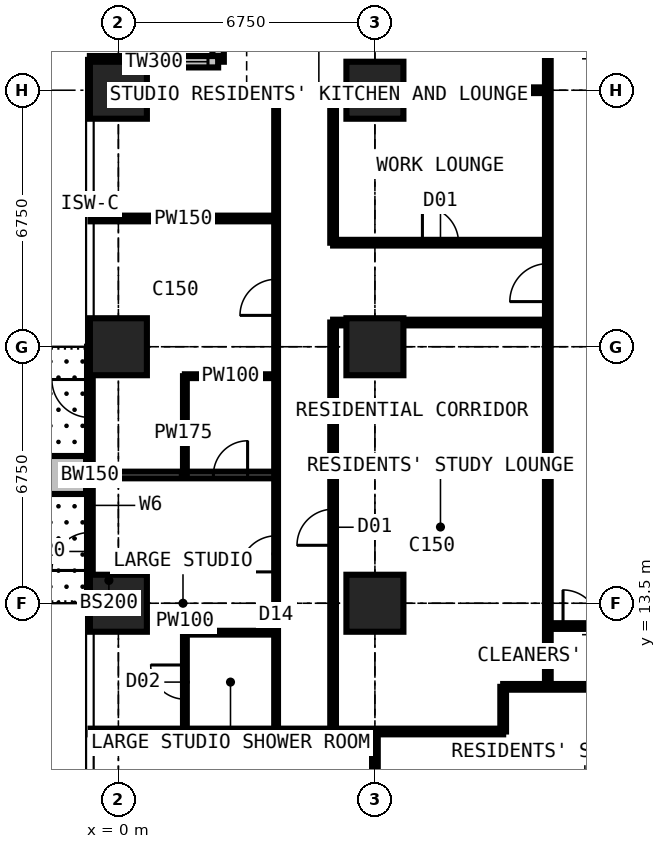
"""IFC4 building model, lengths in metres.
Left out: names, types, materials, properties, quantities, classifications, styles, units other than length and angle.
Written with IfcOpenShell. Run it as: python <this file> out.ifc"""

import sys

from ifc_helpers import new_model, si_unit, direction, frame, frame_2d, origin, origin_2d, place, context, subcontext, project, spatial, rectangle, extrude, element, fill, save


model = new_model("IFC4")
c1 = context("Model", 3, precision=1e-05, world=origin(), true_north=direction((0.0, 1.0)))
c2 = subcontext(c1, "Body", "Model", "MODEL_VIEW")
j1 = project(units=[si_unit("LENGTHUNIT", "METRE"), si_unit("PLANEANGLEUNIT", "RADIAN")], contexts=[c1])
p1 = place(None, origin())
s1 = spatial("IfcSite", under=j1, at=p1, CompositionType="ELEMENT")
p2 = place(p1, origin())
s2 = spatial("IfcBuilding", under=s1, at=p2, CompositionType="ELEMENT")
p3 = place(p2, frame((0.0, 0.0, 149.4)))
s3 = spatial("IfcBuildingStorey", under=s2, at=p3, CompositionType="ELEMENT", Elevation=149.4)
for number, where, z_axis, x_axis in (
    (1, (0.0, 13.5, 0.0), (0.0, 0.0, 1.0), (1.0, 0.0, 0.0)),
    (2, (0.0, 20.25, 0.0), (0.0, 0.0, 1.0), (1.0, 0.0, 0.0)),
    (3, (0.0, 27.0, 0.0), (0.0, 0.0, 1.0), (1.0, 0.0, 0.0)),
    (4, (6.75, 13.5, 0.0), (0.0, 0.0, 1.0), (1.0, 0.0, 0.0)),
    (5, (6.75, 20.25, 0.0), (0.0, 0.0, 1.0), (1.0, 0.0, 0.0)),
    (6, (6.75, 27.0, 0.0), (0.0, 0.0, 1.0), (1.0, 0.0, 0.0)),
):
    element("IfcColumn", number, at=place(p3, frame(where, z_axis=z_axis, x_axis=x_axis)), inside=s3, PredefinedType="COLUMN", context=c2, shape_type="SweptSolid", body=[
        extrude(rectangle(XDim=1.5, YDim=1.5, at=origin_2d()), origin(), (0.0, 0.0, 1.0), 3.6),
    ])
p4 = place(p3, frame((2.625, 31.125, 0.0), z_axis=(0.0, 0.0, 1.0), x_axis=(0.0, -1.0, 0.0)))
e7 = element("IfcWall", 7, at=p4, inside=s3, PredefinedType="SOLIDWALL", context=c2, shape_type="SweptSolid", body=[
    extrude(rectangle(XDim=3.375, YDim=0.3, at=frame_2d((1.688, 0.0))), origin(), (0.0, 0.0, 1.0), 3.375),
])
p5 = place(p4, frame((0.788, 0.0, 0.6)))
e8 = element("IfcOpeningElement", 8, at=p5, cuts=e7, PredefinedType="OPENING", context=c2, shape_type="SweptSolid", body=[
    extrude(rectangle(XDim=1.8, YDim=2.1, at=frame_2d((0.9, 1.05))), frame((0.0, 0.16, 0.0), z_axis=(0.0, -1.0, 0.0), x_axis=(1.0, 0.0, 0.0)), (0.0, 0.0, 1.0), 0.32),
])
p6 = place(p3, frame((2.625, 27.75, 0.0), z_axis=(0.0, 0.0, 1.0), x_axis=(-1.0, 0.0, 0.0)))
e9 = element("IfcWall", 9, at=p6, inside=s3, PredefinedType="SOLIDWALL", context=c2, shape_type="SweptSolid", body=[
    extrude(rectangle(XDim=3.375, YDim=0.3, at=frame_2d((1.688, 0.0))), origin(), (0.0, 0.0, 1.0), 3.375),
])
p7 = place(p6, frame((0.268, 0.0, 0.9)))
e10 = element("IfcOpeningElement", 10, at=p7, cuts=e9, PredefinedType="OPENING", context=c2, shape_type="SweptSolid", body=[
    extrude(rectangle(XDim=1.5, YDim=1.8, at=frame_2d((0.75, 0.9))), frame((0.0, 0.16, 0.0), z_axis=(0.0, -1.0, 0.0), x_axis=(1.0, 0.0, 0.0)), (0.0, 0.0, 1.0), 0.32),
])
p8 = place(p3, frame((-0.75, 13.5, 0.0), z_axis=(0.0, 0.0, 1.0), x_axis=(0.0, 1.0, 0.0)))
e11 = element("IfcWall", 11, at=p8, inside=s3, PredefinedType="SOLIDWALL", context=c2, shape_type="SweptSolid", body=[
    extrude(rectangle(XDim=6.75, YDim=0.15, at=frame_2d((3.375, 0.0))), origin(), (0.0, 0.0, 1.0), 3.375),
])
p9 = place(p8, frame((0.863, 0.0, 0.0)))
e12 = element("IfcOpeningElement", 12, at=p9, cuts=e11, PredefinedType="OPENING", context=c2, shape_type="SweptSolid", body=[
    extrude(rectangle(XDim=1.0, YDim=2.2, at=frame_2d((0.5, 1.1))), frame((0.0, 0.085, 0.0), z_axis=(0.0, -1.0, 0.0), x_axis=(1.0, 0.0, 0.0)), (0.0, 0.0, 1.0), 0.17),
])
p10 = place(p8, frame((1.975, 0.0, 0.9)))
e13 = element("IfcOpeningElement", 13, at=p10, cuts=e11, PredefinedType="OPENING", context=c2, shape_type="SweptSolid", body=[
    extrude(rectangle(XDim=1.2, YDim=1.8, at=frame_2d((0.6, 0.9))), frame((0.0, 0.085, 0.0), z_axis=(0.0, -1.0, 0.0), x_axis=(1.0, 0.0, 0.0)), (0.0, 0.0, 1.0), 0.17),
])
p11 = place(p8, frame((4.887, 0.0, 0.0)))
e14 = element("IfcOpeningElement", 14, at=p11, cuts=e11, PredefinedType="OPENING", context=c2, shape_type="SweptSolid", body=[
    extrude(rectangle(XDim=1.0, YDim=2.2, at=frame_2d((0.5, 1.1))), frame((0.0, 0.085, 0.0), z_axis=(0.0, -1.0, 0.0), x_axis=(1.0, 0.0, 0.0)), (0.0, 0.0, 1.0), 0.17),
])
p12 = place(p8, frame((3.575, 0.0, 0.9)))
e15 = element("IfcOpeningElement", 15, at=p12, cuts=e11, PredefinedType="OPENING", context=c2, shape_type="SweptSolid", body=[
    extrude(rectangle(XDim=1.2, YDim=1.8, at=frame_2d((0.6, 0.9))), frame((0.0, 0.085, 0.0), z_axis=(0.0, -1.0, 0.0), x_axis=(1.0, 0.0, 0.0)), (0.0, 0.0, 1.0), 0.17),
])
p13 = place(p3, frame((-0.85, 16.875, 0.0), z_axis=(0.0, 0.0, 1.0), x_axis=(-1.0, 0.0, 0.0)))
e16 = element("IfcWall", 16, at=p13, inside=s3, PredefinedType="USERDEFINED", context=c2, shape_type="SweptSolid", body=[
    extrude(rectangle(XDim=2.2, YDim=1.0, at=frame_2d((1.1, 0.0))), origin(), (0.0, 0.0, 1.0), 0.9),
])
p14 = place(p3, frame((-0.734, 10.125, 0.0), z_axis=(0.0, 0.0, 1.0), x_axis=(1.0, 0.0, 0.0)))
e17 = element("IfcWall", 17, at=p14, inside=s3, PredefinedType="PARTITIONING", context=c2, shape_type="SweptSolid", body=[
    extrude(rectangle(XDim=10.859, YDim=0.15, at=frame_2d((5.429, 0.0))), origin(), (0.0, 0.0, 1.0), 3.375),
])
p15 = place(p3, frame((-0.734, 16.875, 0.0), z_axis=(0.0, 0.0, 1.0), x_axis=(1.0, 0.0, 0.0)))
e18 = element("IfcWall", 18, at=p15, inside=s3, PredefinedType="PARTITIONING", context=c2, shape_type="SweptSolid", body=[
    extrude(rectangle(XDim=4.884, YDim=0.175, at=frame_2d((2.442, 0.0))), origin(), (0.0, 0.0, 1.0), 3.375),
])
p16 = place(p15, frame((3.234, 0.0, 0.0)))
e19 = element("IfcOpeningElement", 19, at=p16, cuts=e18, PredefinedType="OPENING", context=c2, shape_type="SweptSolid", body=[
    extrude(rectangle(XDim=0.9, YDim=2.2, at=frame_2d((0.45, 1.1))), frame((0.0, 0.097, 0.0), z_axis=(0.0, -1.0, 0.0), x_axis=(1.0, 0.0, 0.0)), (0.0, 0.0, 1.0), 0.195),
])
p17 = place(p3, frame((-0.734, 23.625, 0.0), z_axis=(0.0, 0.0, 1.0), x_axis=(1.0, 0.0, 0.0)))
e20 = element("IfcWall", 20, at=p17, inside=s3, PredefinedType="PARTITIONING", context=c2, shape_type="SweptSolid", body=[
    extrude(rectangle(XDim=4.884, YDim=0.15, at=frame_2d((2.442, 0.0))), origin(), (0.0, 0.0, 1.0), 3.375),
])
p18 = place(p3, frame((1.75, 10.125, 0.0), z_axis=(0.0, 0.0, 1.0), x_axis=(0.0, 1.0, 0.0)))
e21 = element("IfcWall", 21, at=p18, inside=s3, PredefinedType="PARTITIONING", context=c2, shape_type="SweptSolid", body=[
    extrude(rectangle(XDim=2.6, YDim=0.1, at=frame_2d((1.3, 0.0))), origin(), (0.0, 0.0, 1.0), 3.375),
])
p19 = place(p18, frame((0.85, 0.0, 0.0)))
e22 = element("IfcOpeningElement", 22, at=p19, cuts=e21, PredefinedType="OPENING", context=c2, shape_type="SweptSolid", body=[
    extrude(rectangle(XDim=0.9, YDim=2.2, at=frame_2d((0.45, 1.1))), frame((0.0, 0.06, 0.0), z_axis=(0.0, -1.0, 0.0), x_axis=(1.0, 0.0, 0.0)), (0.0, 0.0, 1.0), 0.12),
])
p20 = place(p3, frame((1.75, 12.725, 0.0), z_axis=(0.0, 0.0, 1.0), x_axis=(1.0, 0.0, 0.0)))
e23 = element("IfcWall", 23, at=p20, inside=s3, PredefinedType="PARTITIONING", context=c2, shape_type="SweptSolid", body=[
    extrude(rectangle(XDim=2.4, YDim=0.1, at=frame_2d((1.2, 0.0))), origin(), (0.0, 0.0, 1.0), 3.375),
])
p21 = place(p3, frame((1.75, 16.875, 0.0), z_axis=(0.0, 0.0, 1.0), x_axis=(0.0, 1.0, 0.0)))
e24 = element("IfcWall", 24, at=p21, inside=s3, PredefinedType="PARTITIONING", context=c2, shape_type="SweptSolid", body=[
    extrude(rectangle(XDim=2.6, YDim=0.1, at=frame_2d((1.3, 0.0))), origin(), (0.0, 0.0, 1.0), 3.375),
])
p22 = place(p3, frame((1.75, 19.475, 0.0), z_axis=(0.0, 0.0, 1.0), x_axis=(1.0, 0.0, 0.0)))
e25 = element("IfcWall", 25, at=p22, inside=s3, PredefinedType="PARTITIONING", context=c2, shape_type="SweptSolid", body=[
    extrude(rectangle(XDim=2.4, YDim=0.1, at=frame_2d((1.2, 0.0))), origin(), (0.0, 0.0, 1.0), 3.375),
])
p23 = place(p3, frame((4.15, 10.125, 0.0), z_axis=(0.0, 0.0, 1.0), x_axis=(0.0, 1.0, 0.0)))
e26 = element("IfcWall", 26, at=p23, inside=s3, PredefinedType="PARTITIONING", context=c2, shape_type="SweptSolid", body=[
    extrude(rectangle(XDim=16.875, YDim=0.1, at=frame_2d((8.438, 0.0))), origin(), (0.0, 0.0, 1.0), 3.375),
])
p24 = place(p23, frame((4.2, 0.0, 0.0)))
e27 = element("IfcOpeningElement", 27, at=p24, cuts=e26, PredefinedType="OPENING", context=c2, shape_type="SweptSolid", body=[
    extrude(rectangle(XDim=0.95, YDim=2.2, at=frame_2d((0.475, 1.1))), frame((0.0, 0.06, 0.0), z_axis=(0.0, -1.0, 0.0), x_axis=(1.0, 0.0, 0.0)), (0.0, 0.0, 1.0), 0.12),
])
p25 = place(p23, frame((10.95, 0.0, 0.0)))
e28 = element("IfcOpeningElement", 28, at=p25, cuts=e26, PredefinedType="OPENING", context=c2, shape_type="SweptSolid", body=[
    extrude(rectangle(XDim=0.95, YDim=2.2, at=frame_2d((0.475, 1.1))), frame((0.0, 0.06, 0.0), z_axis=(0.0, -1.0, 0.0), x_axis=(1.0, 0.0, 0.0)), (0.0, 0.0, 1.0), 0.12),
])
p26 = place(p3, frame((4.15, 27.0, 0.0), z_axis=(0.0, 0.0, 1.0), x_axis=(1.0, 0.0, 0.0)))
e29 = element("IfcWall", 29, at=p26, inside=s3, PredefinedType="PARTITIONING", context=c2, shape_type="SweptSolid", body=[
    extrude(rectangle(XDim=7.15, YDim=0.15, at=frame_2d((3.575, 0.0))), origin(), (0.0, 0.0, 1.0), 2.806),
])
p27 = place(p3, frame((5.65, 10.125, 0.0), z_axis=(0.0, 0.0, 1.0), x_axis=(0.0, 1.0, 0.0)))
e30 = element("IfcWall", 30, at=p27, inside=s3, PredefinedType="PARTITIONING", context=c2, shape_type="SweptSolid", body=[
    extrude(rectangle(XDim=10.762, YDim=0.15, at=frame_2d((5.381, 0.0))), origin(), (0.0, 0.0, 1.0), 3.375),
])
p28 = place(p27, frame((4.9, 0.0, 0.0)))
e31 = element("IfcOpeningElement", 31, at=p28, cuts=e30, PredefinedType="OPENING", context=c2, shape_type="SweptSolid", body=[
    extrude(rectangle(XDim=0.95, YDim=2.2, at=frame_2d((0.475, 1.1))), frame((0.0, 0.085, 0.0), z_axis=(0.0, -1.0, 0.0), x_axis=(1.0, 0.0, 0.0)), (0.0, 0.0, 1.0), 0.17),
])
p29 = place(p3, frame((5.65, 20.887, 0.0), z_axis=(0.0, 0.0, 1.0), x_axis=(1.0, 0.0, 0.0)))
e32 = element("IfcWall", 32, at=p29, inside=s3, PredefinedType="PARTITIONING", context=c2, shape_type="SweptSolid", body=[
    extrude(rectangle(XDim=5.65, YDim=0.15, at=frame_2d((2.825, 0.0))), origin(), (0.0, 0.0, 1.0), 3.375),
])
p30 = place(p3, frame((5.65, 22.988, 0.0), z_axis=(0.0, 0.0, 1.0), x_axis=(0.0, 1.0, 0.0)))
e33 = element("IfcWall", 33, at=p30, inside=s3, PredefinedType="PARTITIONING", context=c2, shape_type="SweptSolid", body=[
    extrude(rectangle(XDim=4.012, YDim=0.15, at=frame_2d((2.006, 0.0))), origin(), (0.0, 0.0, 1.0), 3.375),
])
p31 = place(p3, frame((5.65, 22.988, 0.0), z_axis=(0.0, 0.0, 1.0), x_axis=(1.0, 0.0, 0.0)))
e34 = element("IfcWall", 34, at=p31, inside=s3, PredefinedType="PARTITIONING", context=c2, shape_type="SweptSolid", body=[
    extrude(rectangle(XDim=5.65, YDim=0.15, at=frame_2d((2.825, 0.0))), origin(), (0.0, 0.0, 1.0), 3.375),
])
p32 = place(p31, frame((2.35, 0.0, 0.0)))
e35 = element("IfcOpeningElement", 35, at=p32, cuts=e34, PredefinedType="OPENING", context=c2, shape_type="SweptSolid", body=[
    extrude(rectangle(XDim=0.95, YDim=2.2, at=frame_2d((0.475, 1.1))), frame((0.0, 0.085, 0.0), z_axis=(0.0, -1.0, 0.0), x_axis=(1.0, 0.0, 0.0)), (0.0, 0.0, 1.0), 0.17),
])
p33 = place(p3, frame((6.75, 4.15, 0.0), z_axis=(0.0, 0.0, 1.0), x_axis=(0.0, 1.0, 0.0)))
e36 = element("IfcWall", 36, at=p33, inside=s3, PredefinedType="PARTITIONING", context=c2, shape_type="SweptSolid", body=[
    extrude(rectangle(XDim=5.975, YDim=0.15, at=frame_2d((2.988, 0.0))), origin(), (0.0, 0.0, 1.0), 2.877),
])
p34 = place(p3, frame((10.125, 10.125, 0.0), z_axis=(0.0, 0.0, 1.0), x_axis=(0.0, 1.0, 0.0)))
e37 = element("IfcWall", 37, at=p34, inside=s3, PredefinedType="PARTITIONING", context=c2, shape_type="SweptSolid", body=[
    extrude(rectangle(XDim=1.175, YDim=0.15, at=frame_2d((0.587, 0.0))), origin(), (0.0, 0.0, 1.0), 3.375),
])
p35 = place(p3, frame((10.125, 11.3, 0.0), z_axis=(0.0, 0.0, 1.0), x_axis=(1.0, 0.0, 0.0)))
e38 = element("IfcWall", 38, at=p35, inside=s3, PredefinedType="PARTITIONING", context=c2, shape_type="SweptSolid", body=[
    extrude(rectangle(XDim=20.475, YDim=0.15, at=frame_2d((10.238, 0.0))), origin(), (0.0, 0.0, 1.0), 3.375),
])
p36 = place(p35, frame((8.425, 0.0, 0.0)))
e39 = element("IfcOpeningElement", 39, at=p36, cuts=e38, PredefinedType="OPENING", context=c2, shape_type="SweptSolid", body=[
    extrude(rectangle(XDim=1.0, YDim=2.2, at=frame_2d((0.5, 1.1))), frame((0.0, 0.085, 0.0), z_axis=(0.0, -1.0, 0.0), x_axis=(1.0, 0.0, 0.0)), (0.0, 0.0, 1.0), 0.17),
])
p37 = place(p35, frame((10.975, 0.0, 0.0)))
e40 = element("IfcOpeningElement", 40, at=p37, cuts=e38, PredefinedType="OPENING", context=c2, shape_type="SweptSolid", body=[
    extrude(rectangle(XDim=1.0, YDim=2.2, at=frame_2d((0.5, 1.1))), frame((0.0, 0.085, 0.0), z_axis=(0.0, -1.0, 0.0), x_axis=(1.0, 0.0, 0.0)), (0.0, 0.0, 1.0), 0.17),
])
p38 = place(p35, frame((4.875, 0.0, 0.0)))
e41 = element("IfcOpeningElement", 41, at=p38, cuts=e38, PredefinedType="OPENING", context=c2, shape_type="SweptSolid", body=[
    extrude(rectangle(XDim=0.95, YDim=2.2, at=frame_2d((0.475, 1.1))), frame((0.0, 0.085, 0.0), z_axis=(0.0, -1.0, 0.0), x_axis=(1.0, 0.0, 0.0)), (0.0, 0.0, 1.0), 0.17),
])
p39 = place(p3, frame((11.3, 11.3, 0.0), z_axis=(0.0, 0.0, 1.0), x_axis=(0.0, 1.0, 0.0)))
e42 = element("IfcWall", 42, at=p39, inside=s3, PredefinedType="PARTITIONING", context=c2, shape_type="SweptSolid", body=[
    extrude(rectangle(XDim=19.3, YDim=0.15, at=frame_2d((9.65, 0.0))), origin(), (0.0, 0.0, 1.0), 3.375),
])
p40 = place(p39, frame((18.1, 0.0, 0.0)))
e43 = element("IfcOpeningElement", 43, at=p40, cuts=e42, PredefinedType="OPENING", context=c2, shape_type="SweptSolid", body=[
    extrude(rectangle(XDim=1.0, YDim=2.2, at=frame_2d((0.5, 1.1))), frame((0.0, 0.085, 0.0), z_axis=(0.0, -1.0, 0.0), x_axis=(1.0, 0.0, 0.0)), (0.0, 0.0, 1.0), 0.17),
])
p41 = place(p39, frame((10.137, 0.0, 0.0)))
e44 = element("IfcOpeningElement", 44, at=p41, cuts=e42, PredefinedType="OPENING", context=c2, shape_type="SweptSolid", body=[
    extrude(rectangle(XDim=1.0, YDim=2.2, at=frame_2d((0.5, 1.1))), frame((0.0, 0.085, 0.0), z_axis=(0.0, -1.0, 0.0), x_axis=(1.0, 0.0, 0.0)), (0.0, 0.0, 1.0), 0.17),
])
p42 = place(p3, frame((11.3, 12.9, 0.0), z_axis=(0.0, 0.0, 1.0), x_axis=(1.0, 0.0, 0.0)))
e45 = element("IfcWall", 45, at=p42, inside=s3, PredefinedType="PARTITIONING", context=c2, shape_type="SweptSolid", body=[
    extrude(rectangle(XDim=1.8, YDim=0.15, at=frame_2d((0.9, 0.0))), origin(), (0.0, 0.0, 1.0), 2.806),
])
p43 = place(p42, frame((0.4, 0.0, 0.0)))
e46 = element("IfcOpeningElement", 46, at=p43, cuts=e45, PredefinedType="OPENING", context=c2, shape_type="SweptSolid", body=[
    extrude(rectangle(XDim=0.95, YDim=2.2, at=frame_2d((0.475, 1.1))), frame((0.0, 0.085, 0.0), z_axis=(0.0, -1.0, 0.0), x_axis=(1.0, 0.0, 0.0)), (0.0, 0.0, 1.0), 0.17),
])
p44 = place(p7, origin())
e47 = element("IfcWindow", 47, at=p44, inside=s3, PartitioningType="SINGLE_PANEL", PredefinedType="WINDOW", context=c2, shape_type="SweptSolid", body=[
    extrude(rectangle(XDim=1.5, YDim=1.8, at=frame_2d((0.75, 0.9))), frame((0.0, 0.03, 0.0), z_axis=(0.0, -1.0, 0.0), x_axis=(1.0, 0.0, 0.0)), (0.0, 0.0, 1.0), 0.06),
])
fill(e10, e47)
p45 = place(p9, origin())
e48 = element("IfcDoor", 48, at=p45, inside=s3, OperationType="SINGLE_SWING_LEFT", PredefinedType="DOOR", context=c2, shape_type="SweptSolid", body=[
    extrude(rectangle(XDim=1.0, YDim=2.2, at=frame_2d((0.5, 1.1))), frame((0.0, 0.025, 0.0), z_axis=(0.0, -1.0, 0.0), x_axis=(1.0, 0.0, 0.0)), (0.0, 0.0, 1.0), 0.05),
])
fill(e12, e48)
p46 = place(p10, origin())
e49 = element("IfcWindow", 49, at=p46, inside=s3, PartitioningType="SINGLE_PANEL", PredefinedType="WINDOW", context=c2, shape_type="SweptSolid", body=[
    extrude(rectangle(XDim=1.2, YDim=1.8, at=frame_2d((0.6, 0.9))), frame((0.0, 0.03, 0.0), z_axis=(0.0, -1.0, 0.0), x_axis=(1.0, 0.0, 0.0)), (0.0, 0.0, 1.0), 0.06),
])
fill(e13, e49)
p47 = place(p11, origin())
e50 = element("IfcDoor", 50, at=p47, inside=s3, OperationType="SINGLE_SWING_RIGHT", PredefinedType="DOOR", context=c2, shape_type="SweptSolid", body=[
    extrude(rectangle(XDim=1.0, YDim=2.2, at=frame_2d((0.5, 1.1))), frame((0.0, 0.025, 0.0), z_axis=(0.0, -1.0, 0.0), x_axis=(1.0, 0.0, 0.0)), (0.0, 0.0, 1.0), 0.05),
])
fill(e14, e50)
p48 = place(p12, origin())
e51 = element("IfcWindow", 51, at=p48, inside=s3, PartitioningType="SINGLE_PANEL", PredefinedType="WINDOW", context=c2, shape_type="SweptSolid", body=[
    extrude(rectangle(XDim=1.2, YDim=1.8, at=frame_2d((0.6, 0.9))), frame((0.0, 0.03, 0.0), z_axis=(0.0, -1.0, 0.0), x_axis=(1.0, 0.0, 0.0)), (0.0, 0.0, 1.0), 0.06),
])
fill(e15, e51)
p49 = place(p43, origin())
e52 = element("IfcDoor", 52, at=p49, inside=s3, OperationType="SINGLE_SWING_LEFT", PredefinedType="DOOR", context=c2, shape_type="SweptSolid", body=[
    extrude(rectangle(XDim=0.95, YDim=2.2, at=frame_2d((0.475, 1.1))), frame((0.0, 0.025, 0.0), z_axis=(0.0, -1.0, 0.0), x_axis=(1.0, 0.0, 0.0)), (0.0, 0.0, 1.0), 0.05),
])
fill(e46, e52)
p50 = place(p24, origin())
e53 = element("IfcDoor", 53, at=p50, inside=s3, OperationType="SINGLE_SWING_LEFT", PredefinedType="DOOR", context=c2, shape_type="SweptSolid", body=[
    extrude(rectangle(XDim=0.95, YDim=2.2, at=frame_2d((0.475, 1.1))), frame((0.0, 0.025, 0.0), z_axis=(0.0, -1.0, 0.0), x_axis=(1.0, 0.0, 0.0)), (0.0, 0.0, 1.0), 0.05),
])
fill(e27, e53)
p51 = place(p19, origin())
e54 = element("IfcDoor", 54, at=p51, inside=s3, OperationType="SINGLE_SWING_RIGHT", PredefinedType="DOOR", context=c2, shape_type="SweptSolid", body=[
    extrude(rectangle(XDim=0.9, YDim=2.2, at=frame_2d((0.45, 1.1))), frame((0.0, 0.025, 0.0), z_axis=(0.0, -1.0, 0.0), x_axis=(1.0, 0.0, 0.0)), (0.0, 0.0, 1.0), 0.05),
])
fill(e22, e54)
p52 = place(p25, origin())
e55 = element("IfcDoor", 55, at=p52, inside=s3, OperationType="SINGLE_SWING_LEFT", PredefinedType="DOOR", context=c2, shape_type="SweptSolid", body=[
    extrude(rectangle(XDim=0.95, YDim=2.2, at=frame_2d((0.475, 1.1))), frame((0.0, 0.025, 0.0), z_axis=(0.0, -1.0, 0.0), x_axis=(1.0, 0.0, 0.0)), (0.0, 0.0, 1.0), 0.05),
])
fill(e28, e55)
p53 = place(p16, origin())
e56 = element("IfcDoor", 56, at=p53, inside=s3, OperationType="SINGLE_SWING_RIGHT", PredefinedType="DOOR", context=c2, shape_type="SweptSolid", body=[
    extrude(rectangle(XDim=0.9, YDim=2.2, at=frame_2d((0.45, 1.1))), frame((0.0, 0.025, 0.0), z_axis=(0.0, -1.0, 0.0), x_axis=(1.0, 0.0, 0.0)), (0.0, 0.0, 1.0), 0.05),
])
fill(e19, e56)
p54 = place(p41, origin())
e57 = element("IfcDoor", 57, at=p54, inside=s3, OperationType="SINGLE_SWING_LEFT", PredefinedType="DOOR", context=c2, shape_type="SweptSolid", body=[
    extrude(rectangle(XDim=1.0, YDim=2.2, at=frame_2d((0.5, 1.1))), frame((0.0, 0.025, 0.0), z_axis=(0.0, -1.0, 0.0), x_axis=(1.0, 0.0, 0.0)), (0.0, 0.0, 1.0), 0.05),
])
fill(e44, e57)
p55 = place(p28, origin())
e58 = element("IfcDoor", 58, at=p55, inside=s3, OperationType="SINGLE_SWING_LEFT", PredefinedType="DOOR", context=c2, shape_type="SweptSolid", body=[
    extrude(rectangle(XDim=0.95, YDim=2.2, at=frame_2d((0.475, 1.1))), frame((0.0, 0.025, 0.0), z_axis=(0.0, -1.0, 0.0), x_axis=(1.0, 0.0, 0.0)), (0.0, 0.0, 1.0), 0.05),
])
fill(e31, e58)
p56 = place(p32, origin())
e59 = element("IfcDoor", 59, at=p56, inside=s3, OperationType="SINGLE_SWING_LEFT", PredefinedType="DOOR", context=c2, shape_type="SweptSolid", body=[
    extrude(rectangle(XDim=0.95, YDim=2.2, at=frame_2d((0.475, 1.1))), frame((0.0, 0.025, 0.0), z_axis=(0.0, -1.0, 0.0), x_axis=(1.0, 0.0, 0.0)), (0.0, 0.0, 1.0), 0.05),
])
fill(e35, e59)
save(model, sys.argv[1])
